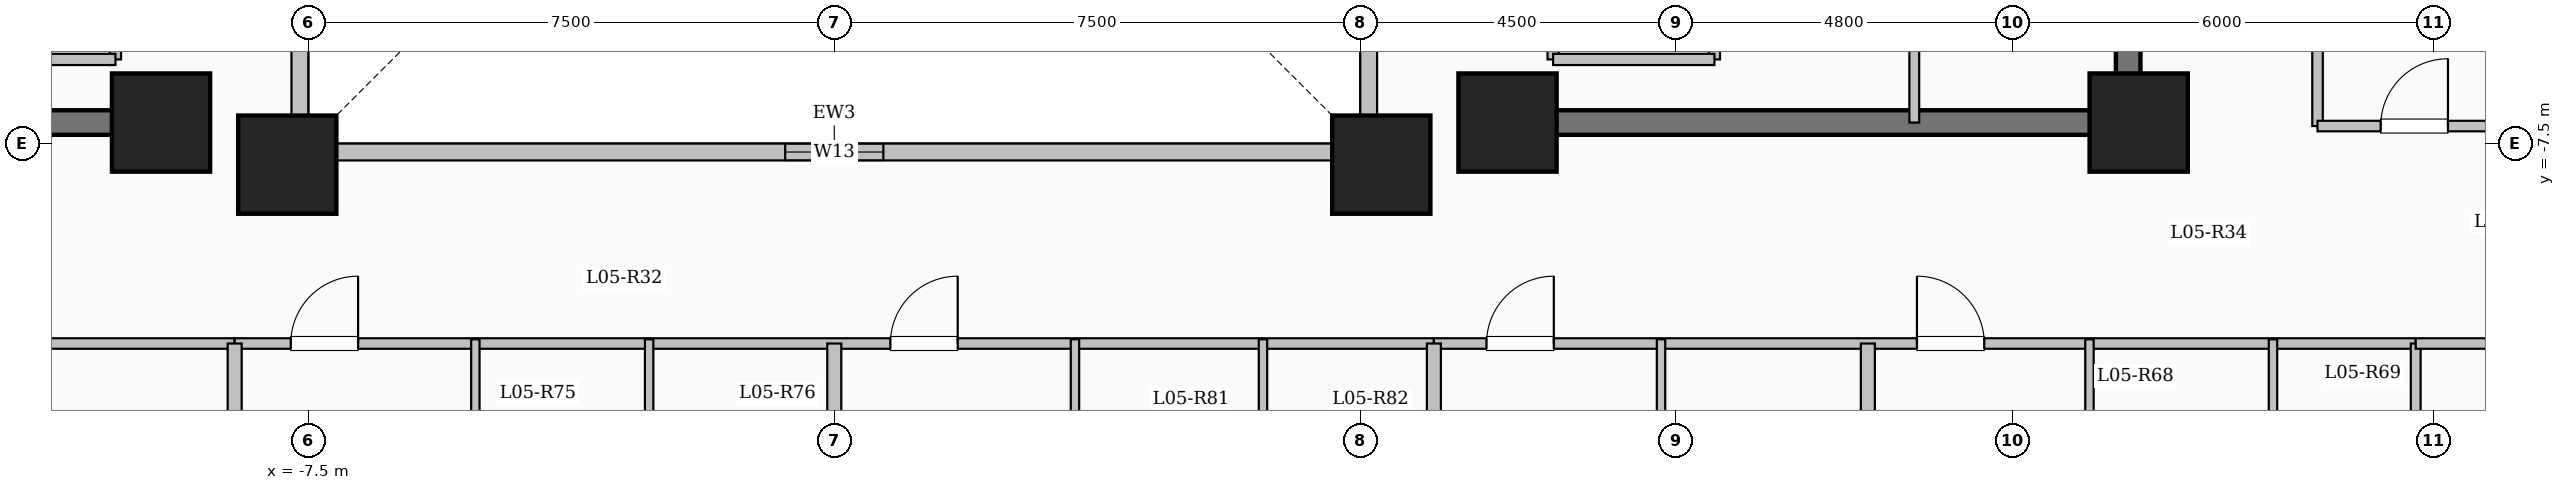
"""IFC4 building model, lengths in metres.
Left out: names, types, materials, properties, quantities, classifications, styles, units other than length and angle.
Written with IfcOpenShell. Run it as: python <this file> out.ifc"""

import sys

from ifc_helpers import new_model, si_unit, direction, frame, frame_2d, origin, origin_2d, place, context, subcontext, project, spatial, rectangle, extrude, element, fill, save


model = new_model("IFC4")
c1 = context("Model", 3, precision=1e-05, world=origin(), true_north=direction((0.0, 1.0)))
c2 = subcontext(c1, "Body", "Model", "MODEL_VIEW")
j1 = project(units=[si_unit("LENGTHUNIT", "METRE"), si_unit("PLANEANGLEUNIT", "RADIAN")], contexts=[c1])
p1 = place(None, origin())
s1 = spatial("IfcSite", under=j1, at=p1, CompositionType="ELEMENT")
p2 = place(p1, origin())
s2 = spatial("IfcBuilding", under=s1, at=p2, CompositionType="ELEMENT")
p3 = place(p2, frame((0.0, 0.0, 24.0)))
s3 = spatial("IfcBuildingStorey", under=s2, at=p3, CompositionType="ELEMENT", Elevation=24.0)
for number, where, z_axis, x_axis in (
    (1, (-7.8, -7.8, 0.0), (0.0, 0.0, 1.0), (1.0, 0.0, 0.0)),
    (2, (7.8, -7.8, 0.0), (0.0, 0.0, 1.0), (1.0, 0.0, 0.0)),
    (3, (-9.6, -7.2, 0.0), (0.0, 0.0, 1.0), (1.0, 0.0, 0.0)),
    (4, (9.6, -7.2, 0.0), (0.0, 0.0, 1.0), (1.0, 0.0, 0.0)),
    (5, (18.6, -7.2, 0.0), (0.0, 0.0, 1.0), (1.0, 0.0, 0.0)),
):
    element("IfcColumn", number, at=place(p3, frame(where, z_axis=z_axis, x_axis=x_axis)), inside=s3, PredefinedType="COLUMN", context=c2, shape_type="SweptSolid", body=[
        extrude(rectangle(XDim=1.4, YDim=1.4, at=origin_2d()), origin(), (0.0, 0.0, 1.0), 3.35),
    ])
p4 = place(p3, frame((-7.62, -7.62, 0.0), z_axis=(0.0, 0.0, 1.0), x_axis=(1.0, 0.0, 0.0)))
e6 = element("IfcWall", 6, at=p4, inside=s3, PredefinedType="SOLIDWALL", context=c2, shape_type="SweptSolid", body=[
    extrude(rectangle(XDim=15.24, YDim=0.24, at=frame_2d((7.62, 0.0))), origin(), (0.0, 0.0, 1.0), 3.1),
])
p5 = place(p4, frame((6.92, 0.0, 0.95)))
e7 = element("IfcOpeningElement", 7, at=p5, cuts=e6, PredefinedType="OPENING", context=c2, shape_type="SweptSolid", body=[
    extrude(rectangle(XDim=1.4, YDim=1.5, at=frame_2d((0.7, 0.75))), frame((0.0, 0.13, 0.0), z_axis=(0.0, -1.0, 0.0), x_axis=(1.0, 0.0, 0.0)), (0.0, 0.0, 1.0), 0.26),
])
p6 = place(p3, frame((7.62, -7.62, 0.0), z_axis=(0.0, 0.0, 1.0), x_axis=(0.0, 1.0, 0.0)))
e8 = element("IfcWall", 8, at=p6, inside=s3, PredefinedType="SOLIDWALL", context=c2, shape_type="SweptSolid", body=[
    extrude(rectangle(XDim=15.24, YDim=0.24, at=frame_2d((7.62, 0.0))), origin(), (0.0, 0.0, 1.0), 3.1),
])
p7 = place(p6, frame((6.92, 0.0, 0.95)))
e9 = element("IfcOpeningElement", 9, at=p7, cuts=e8, PredefinedType="OPENING", context=c2, shape_type="SweptSolid", body=[
    extrude(rectangle(XDim=1.4, YDim=1.5, at=frame_2d((0.7, 0.75))), frame((0.0, 0.13, 0.0), z_axis=(0.0, -1.0, 0.0), x_axis=(1.0, 0.0, 0.0)), (0.0, 0.0, 1.0), 0.26),
])
p8 = place(p3, frame((-7.62, 7.62, 0.0), z_axis=(0.0, 0.0, 1.0), x_axis=(0.0, -1.0, 0.0)))
e10 = element("IfcWall", 10, at=p8, inside=s3, PredefinedType="SOLIDWALL", context=c2, shape_type="SweptSolid", body=[
    extrude(rectangle(XDim=15.24, YDim=0.24, at=frame_2d((7.62, 0.0))), origin(), (0.0, 0.0, 1.0), 3.1),
])
p9 = place(p8, frame((6.92, 0.0, 0.95)))
e11 = element("IfcOpeningElement", 11, at=p9, cuts=e10, PredefinedType="OPENING", context=c2, shape_type="SweptSolid", body=[
    extrude(rectangle(XDim=1.4, YDim=1.5, at=frame_2d((0.7, 0.75))), frame((0.0, 0.13, 0.0), z_axis=(0.0, -1.0, 0.0), x_axis=(1.0, 0.0, 0.0)), (0.0, 0.0, 1.0), 0.26),
])
p10 = place(p3, frame((-10.25, -6.3, 0.0), z_axis=(0.0, 0.0, 1.0), x_axis=(0.0, 1.0, 0.0)))
e12 = element("IfcWall", 12, at=p10, inside=s3, PredefinedType="SOLIDWALL", context=c2, shape_type="SweptSolid", body=[
    extrude(rectangle(XDim=2.6, YDim=0.16, at=frame_2d((1.3, 0.0))), origin(), (0.0, 0.0, 1.0), 3.1),
])
p11 = place(p10, frame((0.75, 0.0, 0.0)))
e13 = element("IfcOpeningElement", 13, at=p11, cuts=e12, PredefinedType="OPENING", context=c2, shape_type="SweptSolid", body=[
    extrude(rectangle(XDim=1.1, YDim=2.15, at=frame_2d((0.55, 1.075))), frame((0.0, 0.09, 0.0), z_axis=(0.0, -1.0, 0.0), x_axis=(1.0, 0.0, 0.0)), (0.0, 0.0, 1.0), 0.18),
])
p12 = place(p3, frame((-12.55, -6.3, 0.0), z_axis=(0.0, 0.0, 1.0), x_axis=(1.0, 0.0, 0.0)))
e14 = element("IfcWall", 14, at=p12, inside=s3, PredefinedType="SOLIDWALL", context=c2, shape_type="SweptSolid", body=[
    extrude(rectangle(XDim=2.3, YDim=0.16, at=frame_2d((1.15, 0.0))), origin(), (0.0, 0.0, 1.0), 3.1),
])
for number, where, z_axis, x_axis in (
    (15, (10.25, -6.3, 0.0), (0.0, 0.0, 1.0), (0.0, 1.0, 0.0)),
    (16, (12.55, -6.3, 0.0), (0.0, 0.0, 1.0), (0.0, 1.0, 0.0)),
):
    element("IfcWall", number, at=place(p3, frame(where, z_axis=z_axis, x_axis=x_axis)), inside=s3, PredefinedType="SOLIDWALL", context=c2, shape_type="SweptSolid", body=[
        extrude(rectangle(XDim=2.6, YDim=0.16, at=frame_2d((1.3, 0.0))), origin(), (0.0, 0.0, 1.0), 3.1),
    ])
p13 = place(p3, frame((10.25, -6.3, 0.0), z_axis=(0.0, 0.0, 1.0), x_axis=(1.0, 0.0, 0.0)))
e17 = element("IfcWall", 17, at=p13, inside=s3, PredefinedType="SOLIDWALL", context=c2, shape_type="SweptSolid", body=[
    extrude(rectangle(XDim=2.3, YDim=0.16, at=frame_2d((1.15, 0.0))), origin(), (0.0, 0.0, 1.0), 3.1),
])
p14 = place(p3, frame((-18.625, -7.2, 0.0), z_axis=(0.0, 0.0, 1.0), x_axis=(1.0, 0.0, 0.0)))
e18 = element("IfcWall", 18, at=p14, inside=s3, PredefinedType="SHEAR", context=c2, shape_type="SweptSolid", body=[
    extrude(rectangle(XDim=8.55, YDim=0.35, at=frame_2d((4.275, 0.0))), origin(), (0.0, 0.0, 1.0), 3.35),
])
p15 = place(p3, frame((18.45, -7.375, 0.0), z_axis=(0.0, 0.0, 1.0), x_axis=(0.0, 1.0, 0.0)))
e19 = element("IfcWall", 19, at=p15, inside=s3, PredefinedType="SHEAR", context=c2, shape_type="SweptSolid", body=[
    extrude(rectangle(XDim=14.05, YDim=0.35, at=frame_2d((7.025, 0.0))), origin(), (0.0, 0.0, 1.0), 3.35),
])
p16 = place(p3, frame((10.075, -7.2, 0.0), z_axis=(0.0, 0.0, 1.0), x_axis=(1.0, 0.0, 0.0)))
e20 = element("IfcWall", 20, at=p16, inside=s3, PredefinedType="SHEAR", context=c2, shape_type="SweptSolid", body=[
    extrude(rectangle(XDim=8.55, YDim=0.35, at=frame_2d((4.275, 0.0))), origin(), (0.0, 0.0, 1.0), 3.35),
])
p17 = place(p3, frame((15.4, -7.2, 0.0), z_axis=(0.0, 0.0, 1.0), x_axis=(0.0, 1.0, 0.0)))
e21 = element("IfcWall", 21, at=p17, inside=s3, PredefinedType="PARTITIONING", context=c2, shape_type="SweptSolid", body=[
    extrude(rectangle(XDim=10.45, YDim=0.14, at=frame_2d((5.225, 0.0))), origin(), (0.0, 0.0, 1.0), 3.1),
])
p18 = place(p17, frame((9.25, 0.0, 0.0)))
e22 = element("IfcOpeningElement", 22, at=p18, cuts=e21, PredefinedType="OPENING", context=c2, shape_type="SweptSolid", body=[
    extrude(rectangle(XDim=0.9, YDim=2.08, at=frame_2d((0.45, 1.04))), frame((0.0, 0.08, 0.0), z_axis=(0.0, -1.0, 0.0), x_axis=(1.0, 0.0, 0.0)), (0.0, 0.0, 1.0), 0.16),
])
p19 = place(p3, frame((21.15, -7.25, 0.0), z_axis=(0.0, 0.0, 1.0), x_axis=(0.0, 1.0, 0.0)))
e23 = element("IfcWall", 23, at=p19, inside=s3, PredefinedType="PARTITIONING", context=c2, shape_type="SweptSolid", body=[
    extrude(rectangle(XDim=18.0, YDim=0.15, at=frame_2d((9.0, 0.0))), origin(), (0.0, 0.0, 1.0), 2.585),
])
p20 = place(p3, frame((-22.55, -10.35, 0.0), z_axis=(0.0, 0.0, 1.0), x_axis=(1.0, 0.0, 0.0)))
e24 = element("IfcWall", 24, at=p20, inside=s3, PredefinedType="PARTITIONING", context=c2, shape_type="SweptSolid", body=[
    extrude(rectangle(XDim=14.0, YDim=0.15, at=frame_2d((7.0, 0.0))), origin(), (0.0, 0.0, 1.0), 3.1),
])
p21 = place(p20, frame((0.7, 0.0, 0.0)))
e25 = element("IfcOpeningElement", 25, at=p21, cuts=e24, PredefinedType="OPENING", context=c2, shape_type="SweptSolid", body=[
    extrude(rectangle(XDim=0.96, YDim=2.15, at=frame_2d((0.48, 1.075))), frame((0.0, 0.085, 0.0), z_axis=(0.0, -1.0, 0.0), x_axis=(1.0, 0.0, 0.0)), (0.0, 0.0, 1.0), 0.17),
])
p22 = place(p20, frame((7.396, 0.0, 0.0)))
e26 = element("IfcOpeningElement", 26, at=p22, cuts=e24, PredefinedType="OPENING", context=c2, shape_type="SweptSolid", body=[
    extrude(rectangle(XDim=0.96, YDim=2.15, at=frame_2d((0.48, 1.075))), frame((0.0, 0.085, 0.0), z_axis=(0.0, -1.0, 0.0), x_axis=(1.0, 0.0, 0.0)), (0.0, 0.0, 1.0), 0.17),
])
p23 = place(p3, frame((-8.55, -10.35, 0.0), z_axis=(0.0, 0.0, 1.0), x_axis=(1.0, 0.0, 0.0)))
e27 = element("IfcWall", 27, at=p23, inside=s3, PredefinedType="PARTITIONING", context=c2, shape_type="SweptSolid", body=[
    extrude(rectangle(XDim=17.1, YDim=0.15, at=frame_2d((8.55, 0.0))), origin(), (0.0, 0.0, 1.0), 3.1),
])
p24 = place(p23, frame((0.8, 0.0, 0.0)))
e28 = element("IfcOpeningElement", 28, at=p24, cuts=e27, PredefinedType="OPENING", context=c2, shape_type="SweptSolid", body=[
    extrude(rectangle(XDim=0.96, YDim=2.15, at=frame_2d((0.48, 1.075))), frame((0.0, 0.085, 0.0), z_axis=(0.0, -1.0, 0.0), x_axis=(1.0, 0.0, 0.0)), (0.0, 0.0, 1.0), 0.17),
])
p25 = place(p23, frame((9.35, 0.0, 0.0)))
e29 = element("IfcOpeningElement", 29, at=p25, cuts=e27, PredefinedType="OPENING", context=c2, shape_type="SweptSolid", body=[
    extrude(rectangle(XDim=0.96, YDim=2.15, at=frame_2d((0.48, 1.075))), frame((0.0, 0.085, 0.0), z_axis=(0.0, -1.0, 0.0), x_axis=(1.0, 0.0, 0.0)), (0.0, 0.0, 1.0), 0.17),
])
p26 = place(p3, frame((8.55, -10.35, 0.0), z_axis=(0.0, 0.0, 1.0), x_axis=(1.0, 0.0, 0.0)))
e30 = element("IfcWall", 30, at=p26, inside=s3, PredefinedType="PARTITIONING", context=c2, shape_type="SweptSolid", body=[
    extrude(rectangle(XDim=14.0, YDim=0.15, at=frame_2d((7.0, 0.0))), origin(), (0.0, 0.0, 1.0), 3.1),
])
p27 = place(p26, frame((0.75, 0.0, 0.0)))
e31 = element("IfcOpeningElement", 31, at=p27, cuts=e30, PredefinedType="OPENING", context=c2, shape_type="SweptSolid", body=[
    extrude(rectangle(XDim=0.96, YDim=2.15, at=frame_2d((0.48, 1.075))), frame((0.0, 0.085, 0.0), z_axis=(0.0, -1.0, 0.0), x_axis=(1.0, 0.0, 0.0)), (0.0, 0.0, 1.0), 0.17),
])
p28 = place(p26, frame((6.888, 0.0, 0.0)))
e32 = element("IfcOpeningElement", 32, at=p28, cuts=e30, PredefinedType="OPENING", context=c2, shape_type="SweptSolid", body=[
    extrude(rectangle(XDim=0.96, YDim=2.15, at=frame_2d((0.48, 1.075))), frame((0.0, 0.085, 0.0), z_axis=(0.0, -1.0, 0.0), x_axis=(1.0, 0.0, 0.0)), (0.0, 0.0, 1.0), 0.17),
])
p29 = place(p3, frame((14.738, -23.6, 0.0), z_axis=(0.0, 0.0, 1.0), x_axis=(0.0, 1.0, 0.0)))
e33 = element("IfcWall", 33, at=p29, inside=s3, PredefinedType="SOLIDWALL", context=c2, shape_type="SweptSolid", body=[
    extrude(rectangle(XDim=13.25, YDim=0.2, at=frame_2d((6.625, 0.0))), origin(), (0.0, 0.0, 1.0), 2.435),
])
p30 = place(p3, frame((11.789, -13.51, 0.0), z_axis=(0.0, 0.0, 1.0), x_axis=(0.0, 1.0, 0.0)))
e34 = element("IfcWall", 34, at=p30, inside=s3, PredefinedType="PARTITIONING", context=c2, shape_type="SweptSolid", body=[
    extrude(rectangle(XDim=3.22, YDim=0.12, at=frame_2d((1.61, 0.0))), origin(), (0.0, 0.0, 1.0), 3.1),
])
p31 = place(p30, frame((1.14, 0.0, 0.0)))
e35 = element("IfcOpeningElement", 35, at=p31, cuts=e34, PredefinedType="OPENING", context=c2, shape_type="SweptSolid", body=[
    extrude(rectangle(XDim=0.88, YDim=2.1, at=frame_2d((0.44, 1.05))), frame((0.0, 0.07, 0.0), z_axis=(0.0, -1.0, 0.0), x_axis=(1.0, 0.0, 0.0)), (0.0, 0.0, 1.0), 0.14),
])
p32 = place(p3, frame((17.898, -23.6, 0.0), z_axis=(0.0, 0.0, 1.0), x_axis=(0.0, 1.0, 0.0)))
e36 = element("IfcWall", 36, at=p32, inside=s3, PredefinedType="PARTITIONING", context=c2, shape_type="SweptSolid", body=[
    extrude(rectangle(XDim=13.31, YDim=0.12, at=frame_2d((6.655, 0.0))), origin(), (0.0, 0.0, 1.0), 3.1),
])
p33 = place(p32, frame((9.485, 0.0, 0.0)))
e37 = element("IfcOpeningElement", 37, at=p33, cuts=e36, PredefinedType="OPENING", context=c2, shape_type="SweptSolid", body=[
    extrude(rectangle(XDim=1.08, YDim=2.15, at=frame_2d((0.54, 1.075))), frame((0.0, 0.07, 0.0), z_axis=(0.0, -1.0, 0.0), x_axis=(1.0, 0.0, 0.0)), (0.0, 0.0, 1.0), 0.14),
])
p34 = place(p3, frame((20.515, -12.75, 0.0), z_axis=(0.0, 0.0, 1.0), x_axis=(0.0, 1.0, 0.0)))
e38 = element("IfcWall", 38, at=p34, inside=s3, PredefinedType="PARTITIONING", context=c2, shape_type="SweptSolid", body=[
    extrude(rectangle(XDim=2.46, YDim=0.12, at=frame_2d((1.23, 0.0))), origin(), (0.0, 0.0, 1.0), 3.1),
])
for number, where, z_axis, x_axis in (
    (39, (-8.55, -24.204, 0.0), (0.0, 0.0, 1.0), (0.0, 1.0, 0.0)),
    (40, (8.55, -24.204, 0.0), (0.0, 0.0, 1.0), (0.0, 1.0, 0.0)),
):
    element("IfcWall", number, at=place(p3, frame(where, z_axis=z_axis, x_axis=x_axis)), inside=s3, PredefinedType="SOLIDWALL", context=c2, shape_type="SweptSolid", body=[
        extrude(rectangle(XDim=13.854, YDim=0.2, at=frame_2d((6.927, 0.0))), origin(), (0.0, 0.0, 1.0), 3.1),
    ])
p35 = place(p3, frame((0.0, -25.08, 0.0), z_axis=(0.0, 0.0, 1.0), x_axis=(0.0, 1.0, 0.0)))
e41 = element("IfcWall", 41, at=p35, inside=s3, PredefinedType="SOLIDWALL", context=c2, shape_type="SweptSolid", body=[
    extrude(rectangle(XDim=14.73, YDim=0.2, at=frame_2d((7.365, 0.0))), origin(), (0.0, 0.0, 1.0), 3.1),
])
p36 = place(p3, frame((-5.118, -25.051, 0.0), z_axis=(0.0, 0.0, 1.0), x_axis=(0.0, 1.0, 0.0)))
e42 = element("IfcWall", 42, at=p36, inside=s3, PredefinedType="PARTITIONING", context=c2, shape_type="SweptSolid", body=[
    extrude(rectangle(XDim=14.761, YDim=0.12, at=frame_2d((7.38, 0.0))), origin(), (0.0, 0.0, 1.0), 3.1),
])
p37 = place(p36, frame((10.766, 0.0, 0.0)))
e43 = element("IfcOpeningElement", 43, at=p37, cuts=e42, PredefinedType="OPENING", context=c2, shape_type="SweptSolid", body=[
    extrude(rectangle(XDim=1.08, YDim=2.15, at=frame_2d((0.54, 1.075))), frame((0.0, 0.07, 0.0), z_axis=(0.0, -1.0, 0.0), x_axis=(1.0, 0.0, 0.0)), (0.0, 0.0, 1.0), 0.14),
])
p38 = place(p3, frame((-2.64, -12.92, 0.0), z_axis=(0.0, 0.0, 1.0), x_axis=(0.0, 1.0, 0.0)))
e44 = element("IfcWall", 44, at=p38, inside=s3, PredefinedType="PARTITIONING", context=c2, shape_type="SweptSolid", body=[
    extrude(rectangle(XDim=2.63, YDim=0.12, at=frame_2d((1.315, 0.0))), origin(), (0.0, 0.0, 1.0), 3.1),
])
p39 = place(p3, frame((3.432, -25.08, 0.0), z_axis=(0.0, 0.0, 1.0), x_axis=(0.0, 1.0, 0.0)))
e45 = element("IfcWall", 45, at=p39, inside=s3, PredefinedType="PARTITIONING", context=c2, shape_type="SweptSolid", body=[
    extrude(rectangle(XDim=14.79, YDim=0.12, at=frame_2d((7.395, 0.0))), origin(), (0.0, 0.0, 1.0), 3.1),
])
p40 = place(p39, frame((10.625, 0.0, 0.0)))
e46 = element("IfcOpeningElement", 46, at=p40, cuts=e45, PredefinedType="OPENING", context=c2, shape_type="SweptSolid", body=[
    extrude(rectangle(XDim=1.08, YDim=2.15, at=frame_2d((0.54, 1.075))), frame((0.0, 0.07, 0.0), z_axis=(0.0, -1.0, 0.0), x_axis=(1.0, 0.0, 0.0)), (0.0, 0.0, 1.0), 0.14),
])
p41 = place(p3, frame((6.113, -13.09, 0.0), z_axis=(0.0, 0.0, 1.0), x_axis=(0.0, 1.0, 0.0)))
e47 = element("IfcWall", 47, at=p41, inside=s3, PredefinedType="PARTITIONING", context=c2, shape_type="SweptSolid", body=[
    extrude(rectangle(XDim=2.8, YDim=0.12, at=frame_2d((1.4, 0.0))), origin(), (0.0, 0.0, 1.0), 3.1),
])
p42 = place(p3, frame((21.15, -7.25, 0.0), z_axis=(0.0, 0.0, 1.0), x_axis=(1.0, 0.0, 0.0)))
e48 = element("IfcWall", 48, at=p42, inside=s3, PredefinedType="PARTITIONING", context=c2, shape_type="SweptSolid", body=[
    extrude(rectangle(XDim=7.53, YDim=0.15, at=frame_2d((3.765, 0.0))), origin(), (0.0, 0.0, 1.0), 3.1),
])
p43 = place(p42, frame((0.9, 0.0, 0.0)))
e49 = element("IfcOpeningElement", 49, at=p43, cuts=e48, PredefinedType="OPENING", context=c2, shape_type="SweptSolid", body=[
    extrude(rectangle(XDim=0.96, YDim=2.15, at=frame_2d((0.48, 1.075))), frame((0.0, 0.085, 0.0), z_axis=(0.0, -1.0, 0.0), x_axis=(1.0, 0.0, 0.0)), (0.0, 0.0, 1.0), 0.17),
])
p44 = place(p3, frame((22.55, -19.05, 0.0), z_axis=(0.0, 0.0, 1.0), x_axis=(0.0, 1.0, 0.0)))
e50 = element("IfcWall", 50, at=p44, inside=s3, PredefinedType="PARTITIONING", context=c2, shape_type="SweptSolid", body=[
    extrude(rectangle(XDim=8.7, YDim=0.14, at=frame_2d((4.35, 0.0))), origin(), (0.0, 0.0, 1.0), 3.1),
])
p45 = place(p3, frame((22.55, -10.35, 0.0), z_axis=(0.0, 0.0, 1.0), x_axis=(1.0, 0.0, 0.0)))
e51 = element("IfcWall", 51, at=p45, inside=s3, PredefinedType="PARTITIONING", context=c2, shape_type="SweptSolid", body=[
    extrude(rectangle(XDim=6.13, YDim=0.15, at=frame_2d((3.065, 0.0))), origin(), (0.0, 0.0, 1.0), 3.1),
])
p46 = place(p45, frame((2.59, 0.0, 0.0)))
e52 = element("IfcOpeningElement", 52, at=p46, cuts=e51, PredefinedType="OPENING", context=c2, shape_type="SweptSolid", body=[
    extrude(rectangle(XDim=0.95, YDim=2.15, at=frame_2d((0.475, 1.075))), frame((0.0, 0.085, 0.0), z_axis=(0.0, -1.0, 0.0), x_axis=(1.0, 0.0, 0.0)), (0.0, 0.0, 1.0), 0.17),
])
p47 = place(p5, origin())
e53 = element("IfcWindow", 53, at=p47, inside=s3, PartitioningType="SINGLE_PANEL", PredefinedType="WINDOW", context=c2, shape_type="SweptSolid", body=[
    extrude(rectangle(XDim=1.4, YDim=1.5, at=frame_2d((0.7, 0.75))), frame((0.0, 0.03, 0.0), z_axis=(0.0, -1.0, 0.0), x_axis=(1.0, 0.0, 0.0)), (0.0, 0.0, 1.0), 0.06),
])
fill(e7, e53)
p48 = place(p27, origin())
e54 = element("IfcDoor", 54, at=p48, inside=s3, OperationType="SINGLE_SWING_RIGHT", PredefinedType="DOOR", context=c2, shape_type="SweptSolid", body=[
    extrude(rectangle(XDim=0.96, YDim=2.15, at=frame_2d((0.48, 1.075))), frame((0.0, 0.025, 0.0), z_axis=(0.0, -1.0, 0.0), x_axis=(1.0, 0.0, 0.0)), (0.0, 0.0, 1.0), 0.05),
])
fill(e31, e54)
p49 = place(p28, origin())
e55 = element("IfcDoor", 55, at=p49, inside=s3, OperationType="SINGLE_SWING_LEFT", PredefinedType="DOOR", context=c2, shape_type="SweptSolid", body=[
    extrude(rectangle(XDim=0.96, YDim=2.15, at=frame_2d((0.48, 1.075))), frame((0.0, 0.025, 0.0), z_axis=(0.0, -1.0, 0.0), x_axis=(1.0, 0.0, 0.0)), (0.0, 0.0, 1.0), 0.05),
])
fill(e32, e55)
p50 = place(p24, origin())
e56 = element("IfcDoor", 56, at=p50, inside=s3, OperationType="SINGLE_SWING_RIGHT", PredefinedType="DOOR", context=c2, shape_type="SweptSolid", body=[
    extrude(rectangle(XDim=0.96, YDim=2.15, at=frame_2d((0.48, 1.075))), frame((0.0, 0.025, 0.0), z_axis=(0.0, -1.0, 0.0), x_axis=(1.0, 0.0, 0.0)), (0.0, 0.0, 1.0), 0.05),
])
fill(e28, e56)
p51 = place(p25, origin())
e57 = element("IfcDoor", 57, at=p51, inside=s3, OperationType="SINGLE_SWING_RIGHT", PredefinedType="DOOR", context=c2, shape_type="SweptSolid", body=[
    extrude(rectangle(XDim=0.96, YDim=2.15, at=frame_2d((0.48, 1.075))), frame((0.0, 0.025, 0.0), z_axis=(0.0, -1.0, 0.0), x_axis=(1.0, 0.0, 0.0)), (0.0, 0.0, 1.0), 0.05),
])
fill(e29, e57)
p52 = place(p43, origin())
e58 = element("IfcDoor", 58, at=p52, inside=s3, OperationType="SINGLE_SWING_RIGHT", PredefinedType="DOOR", context=c2, shape_type="SweptSolid", body=[
    extrude(rectangle(XDim=0.96, YDim=2.15, at=frame_2d((0.48, 1.075))), frame((0.0, 0.025, 0.0), z_axis=(0.0, -1.0, 0.0), x_axis=(1.0, 0.0, 0.0)), (0.0, 0.0, 1.0), 0.05),
])
fill(e49, e58)
save(model, sys.argv[1])
